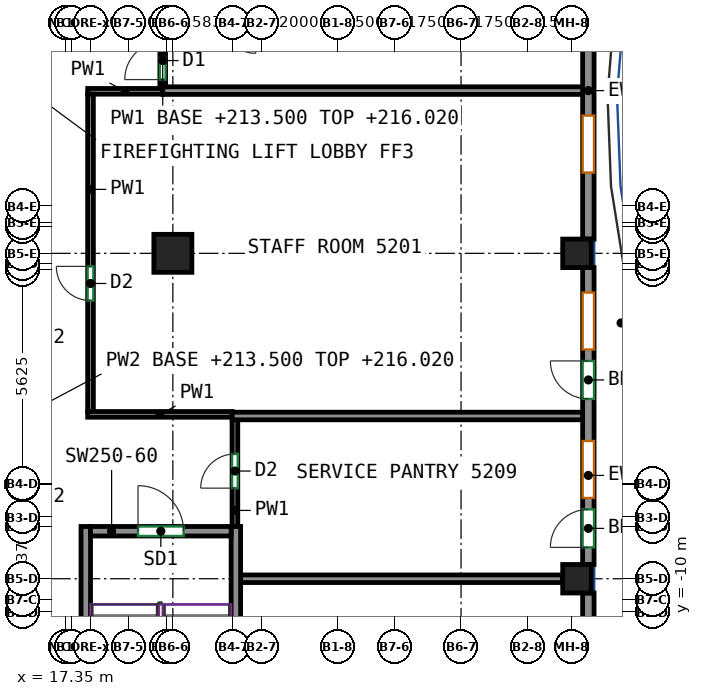
"""IFC4 building model, lengths in metres.
Left out: names, types, materials, properties, quantities, classifications, styles, units other than length and angle.
Written with IfcOpenShell. Run it as: python <this file> out.ifc"""

import sys

from ifc_helpers import new_model, si_unit, direction, frame, frame_2d, origin, origin_2d, place, context, subcontext, project, spatial, rectangle, extrude, source, transform, mapped, element, fill, save


model = new_model("IFC4")
c1 = context("Model", 3, precision=1e-05, world=origin(), true_north=direction((0.0, 1.0)))
c2 = subcontext(c1, "Body", "Model", "MODEL_VIEW")
j1 = project(units=[si_unit("LENGTHUNIT", "METRE"), si_unit("PLANEANGLEUNIT", "RADIAN")], contexts=[c1])
p1 = place(None, origin())
s1 = spatial("IfcSite", under=j1, at=p1, CompositionType="ELEMENT")
p2 = place(p1, origin())
s2 = spatial("IfcBuilding", under=s1, at=p2, CompositionType="ELEMENT")
p3 = place(p2, frame((0.0, 0.0, 213.5)))
s3 = spatial("IfcBuildingStorey", under=s2, at=p3, CompositionType="ELEMENT", Elevation=213.5)
m1 = source(origin(), c2, "Body", "SweptSolid", [
    extrude(rectangle(XDim=1.0, YDim=1.0, at=origin_2d()), origin(), (0.0, 0.0, 1.0), 3.12),
])
p4 = place(p3, frame((20.167, -0.562, 0.0), z_axis=(0.0, 0.0, 1.0), x_axis=(1.0, 0.0, 0.0)))
e1 = element("IfcColumn", 1, at=p4, inside=s3, PredefinedType="COLUMN", context=c2, shape_type="MappedRepresentation", body=[
    mapped(m1, transform((0.0, 0.0, 0.0))),
])
m2 = source(origin(), c2, "Body", "SweptSolid", [
    extrude(rectangle(XDim=0.75, YDim=0.75, at=origin_2d()), origin(), (0.0, 0.0, 1.0), 3.12),
])
for number, where, z_axis, x_axis in (
    (2, (30.8, -9.125, 0.0), (0.0, 0.0, 1.0), (1.0, 0.0, 0.0)),
    (3, (30.8, -0.562, 0.0), (0.0, 0.0, 1.0), (1.0, 0.0, 0.0)),
):
    element("IfcColumn", number, at=place(p3, frame(where, z_axis=z_axis, x_axis=x_axis)), inside=s3, PredefinedType="COLUMN", context=c2, shape_type="MappedRepresentation", body=[
        mapped(m2, transform((0.0, 0.0, 0.0))),
    ])
m3 = source(origin(), c2, "Body", "SweptSolid", [
    extrude(rectangle(XDim=8.0, YDim=0.25, at=frame_2d((4.0, 0.0))), origin(), (0.0, 0.0, 1.0), 3.12),
])
for number, where, z_axis, x_axis in (
    (4, (17.875, -15.75, 0.0), (0.0, 0.0, 1.0), (0.0, 1.0, 0.0)),
    (5, (21.825, -15.75, 0.0), (0.0, 0.0, 1.0), (0.0, 1.0, 0.0)),
):
    element("IfcWall", number, at=place(p3, frame(where, z_axis=z_axis, x_axis=x_axis)), inside=s3, PredefinedType="SHEAR", context=c2, shape_type="MappedRepresentation", body=[
        mapped(m3, transform((0.0, 0.0, 0.0))),
    ])
m4 = source(origin(), c2, "Body", "SweptSolid", [
    extrude(rectangle(XDim=3.7, YDim=0.25, at=frame_2d((1.85, 0.0))), origin(), (0.0, 0.0, 1.0), 3.12),
])
p5 = place(p3, frame((18.0, -7.875, 0.0), z_axis=(0.0, 0.0, 1.0), x_axis=(1.0, 0.0, 0.0)))
e6 = element("IfcWall", 6, at=p5, inside=s3, PredefinedType="SHEAR", context=c2, shape_type="MappedRepresentation", body=[
    mapped(m4, transform((0.0, 0.0, 0.0))),
])
p6 = place(p5, frame((1.25, 0.0, 0.0)))
e7 = element("IfcOpeningElement", 7, at=p6, cuts=e6, PredefinedType="OPENING", context=c2, shape_type="SweptSolid", body=[
    extrude(rectangle(XDim=1.2, YDim=2.1, at=frame_2d((0.6, 1.05))), frame((0.0, 0.135, 0.0), z_axis=(0.0, -1.0, 0.0), x_axis=(1.0, 0.0, 0.0)), (0.0, 0.0, 1.0), 0.27),
])
m5 = source(origin(), c2, "Body", "SweptSolid", [
    extrude(rectangle(XDim=7.812, YDim=0.3, at=frame_2d((3.906, 0.0))), origin(), (0.0, 0.0, 1.0), 3.12),
])
p7 = place(p3, frame((31.1, -17.312, 0.0), z_axis=(0.0, 0.0, 1.0), x_axis=(0.0, 1.0, 0.0)))
e8 = element("IfcWall", 8, at=p7, inside=s3, PredefinedType="SOLIDWALL", context=c2, shape_type="MappedRepresentation", body=[
    mapped(m5, transform((0.0, 0.0, 0.0))),
])
p8 = place(p7, frame((1.75, 0.0, 0.85)))
e9 = element("IfcOpeningElement", 9, at=p8, cuts=e8, PredefinedType="OPENING", context=c2, shape_type="SweptSolid", body=[
    extrude(rectangle(XDim=1.5, YDim=1.95, at=frame_2d((0.75, 0.975))), frame((0.0, 0.16, 0.0), z_axis=(0.0, -1.0, 0.0), x_axis=(1.0, 0.0, 0.0)), (0.0, 0.0, 1.0), 0.32),
])
p9 = place(p7, frame((0.45, 0.0, 0.0)))
e10 = element("IfcOpeningElement", 10, at=p9, cuts=e8, PredefinedType="OPENING", context=c2, shape_type="SweptSolid", body=[
    extrude(rectangle(XDim=1.0, YDim=2.1, at=frame_2d((0.5, 1.05))), frame((0.0, 0.16, 0.0), z_axis=(0.0, -1.0, 0.0), x_axis=(1.0, 0.0, 0.0)), (0.0, 0.0, 1.0), 0.32),
])
p10 = place(p7, frame((5.656, 0.0, 0.85)))
e11 = element("IfcOpeningElement", 11, at=p10, cuts=e8, PredefinedType="OPENING", context=c2, shape_type="SweptSolid", body=[
    extrude(rectangle(XDim=1.5, YDim=1.95, at=frame_2d((0.75, 0.975))), frame((0.0, 0.16, 0.0), z_axis=(0.0, -1.0, 0.0), x_axis=(1.0, 0.0, 0.0)), (0.0, 0.0, 1.0), 0.32),
])
p11 = place(p7, frame((4.356, 0.0, 0.0)))
e12 = element("IfcOpeningElement", 12, at=p11, cuts=e8, PredefinedType="OPENING", context=c2, shape_type="SweptSolid", body=[
    extrude(rectangle(XDim=1.0, YDim=2.1, at=frame_2d((0.5, 1.05))), frame((0.0, 0.16, 0.0), z_axis=(0.0, -1.0, 0.0), x_axis=(1.0, 0.0, 0.0)), (0.0, 0.0, 1.0), 0.32),
])
p12 = place(p3, frame((31.1, -8.75, 0.0), z_axis=(0.0, 0.0, 1.0), x_axis=(0.0, 1.0, 0.0)))
e13 = element("IfcWall", 13, at=p12, inside=s3, PredefinedType="SOLIDWALL", context=c2, shape_type="MappedRepresentation", body=[
    mapped(m5, transform((0.0, 0.0, 0.0))),
])
p13 = place(p12, frame((1.75, 0.0, 0.85)))
e14 = element("IfcOpeningElement", 14, at=p13, cuts=e13, PredefinedType="OPENING", context=c2, shape_type="SweptSolid", body=[
    extrude(rectangle(XDim=1.5, YDim=1.95, at=frame_2d((0.75, 0.975))), frame((0.0, 0.16, 0.0), z_axis=(0.0, -1.0, 0.0), x_axis=(1.0, 0.0, 0.0)), (0.0, 0.0, 1.0), 0.32),
])
p14 = place(p12, frame((0.45, 0.0, 0.0)))
e15 = element("IfcOpeningElement", 15, at=p14, cuts=e13, PredefinedType="OPENING", context=c2, shape_type="SweptSolid", body=[
    extrude(rectangle(XDim=1.0, YDim=2.1, at=frame_2d((0.5, 1.05))), frame((0.0, 0.16, 0.0), z_axis=(0.0, -1.0, 0.0), x_axis=(1.0, 0.0, 0.0)), (0.0, 0.0, 1.0), 0.32),
])
p15 = place(p12, frame((5.656, 0.0, 0.85)))
e16 = element("IfcOpeningElement", 16, at=p15, cuts=e13, PredefinedType="OPENING", context=c2, shape_type="SweptSolid", body=[
    extrude(rectangle(XDim=1.5, YDim=1.95, at=frame_2d((0.75, 0.975))), frame((0.0, 0.16, 0.0), z_axis=(0.0, -1.0, 0.0), x_axis=(1.0, 0.0, 0.0)), (0.0, 0.0, 1.0), 0.32),
])
p16 = place(p12, frame((4.356, 0.0, 0.0)))
e17 = element("IfcOpeningElement", 17, at=p16, cuts=e13, PredefinedType="OPENING", context=c2, shape_type="SweptSolid", body=[
    extrude(rectangle(XDim=1.0, YDim=2.1, at=frame_2d((0.5, 1.05))), frame((0.0, 0.16, 0.0), z_axis=(0.0, -1.0, 0.0), x_axis=(1.0, 0.0, 0.0)), (0.0, 0.0, 1.0), 0.32),
])
p17 = place(p3, frame((31.1, -0.188, 0.0), z_axis=(0.0, 0.0, 1.0), x_axis=(0.0, 1.0, 0.0)))
e18 = element("IfcWall", 18, at=p17, inside=s3, PredefinedType="SOLIDWALL", context=c2, shape_type="MappedRepresentation", body=[
    mapped(m5, transform((0.0, 0.0, 0.0))),
])
p18 = place(p17, frame((1.75, 0.0, 0.85)))
e19 = element("IfcOpeningElement", 19, at=p18, cuts=e18, PredefinedType="OPENING", context=c2, shape_type="SweptSolid", body=[
    extrude(rectangle(XDim=1.5, YDim=1.95, at=frame_2d((0.75, 0.975))), frame((0.0, 0.16, 0.0), z_axis=(0.0, -1.0, 0.0), x_axis=(1.0, 0.0, 0.0)), (0.0, 0.0, 1.0), 0.32),
])
p19 = place(p17, frame((5.656, 0.0, 0.85)))
e20 = element("IfcOpeningElement", 20, at=p19, cuts=e18, PredefinedType="OPENING", context=c2, shape_type="SweptSolid", body=[
    extrude(rectangle(XDim=1.5, YDim=1.95, at=frame_2d((0.75, 0.975))), frame((0.0, 0.16, 0.0), z_axis=(0.0, -1.0, 0.0), x_axis=(1.0, 0.0, 0.0)), (0.0, 0.0, 1.0), 0.32),
])
p20 = place(p3, frame((19.9, 3.809, 0.0), z_axis=(0.0, 0.0, 1.0), x_axis=(0.0, 1.0, 0.0)))
e21 = element("IfcWall", 21, at=p20, inside=s3, PredefinedType="PARTITIONING", context=c2, shape_type="SweptSolid", body=[
    extrude(rectangle(XDim=1.751, YDim=0.15, at=frame_2d((0.875, 0.0))), origin(), (0.0, 0.0, 1.0), 2.52),
])
p21 = place(p20, frame((0.2, 0.0, 0.0)))
e22 = element("IfcOpeningElement", 22, at=p21, cuts=e21, PredefinedType="OPENING", context=c2, shape_type="SweptSolid", body=[
    extrude(rectangle(XDim=1.0, YDim=2.1, at=frame_2d((0.5, 1.05))), frame((0.0, 0.085, 0.0), z_axis=(0.0, -1.0, 0.0), x_axis=(1.0, 0.0, 0.0)), (0.0, 0.0, 1.0), 0.17),
])
p22 = place(p3, frame((17.925, 3.7, 0.0), z_axis=(0.0, 0.0, 1.0), x_axis=(1.0, 0.0, 0.0)))
e23 = element("IfcWall", 23, at=p22, inside=s3, PredefinedType="PARTITIONING", context=c2, shape_type="SweptSolid", body=[
    extrude(rectangle(XDim=1.975, YDim=0.15, at=frame_2d((0.987, 0.0))), origin(), (0.0, 0.0, 1.0), 3.12),
])
p23 = place(p3, frame((18.0, -4.725, 0.0), z_axis=(0.0, 0.0, 1.0), x_axis=(0.0, 1.0, 0.0)))
e24 = element("IfcWall", 24, at=p23, inside=s3, PredefinedType="PARTITIONING", context=c2, shape_type="SweptSolid", body=[
    extrude(rectangle(XDim=8.35, YDim=0.15, at=frame_2d((4.175, 0.0))), origin(), (0.0, 0.0, 1.0), 3.12),
])
p24 = place(p23, frame((2.919, 0.0, 0.0)))
e25 = element("IfcOpeningElement", 25, at=p24, cuts=e24, PredefinedType="OPENING", context=c2, shape_type="SweptSolid", body=[
    extrude(rectangle(XDim=0.9, YDim=2.1, at=frame_2d((0.45, 1.05))), frame((0.0, 0.085, 0.0), z_axis=(0.0, -1.0, 0.0), x_axis=(1.0, 0.0, 0.0)), (0.0, 0.0, 1.0), 0.17),
])
p25 = place(p3, frame((17.925, -4.8, 0.0), z_axis=(0.0, 0.0, 1.0), x_axis=(1.0, 0.0, 0.0)))
e26 = element("IfcWall", 26, at=p25, inside=s3, PredefinedType="PARTITIONING", context=c2, shape_type="SweptSolid", body=[
    extrude(rectangle(XDim=3.802, YDim=0.15, at=frame_2d((1.901, 0.0))), origin(), (0.0, 0.0, 1.0), 3.12),
])
p26 = place(p3, frame((21.8, -7.75, 0.0), z_axis=(0.0, 0.0, 1.0), x_axis=(0.0, 1.0, 0.0)))
e27 = element("IfcWall", 27, at=p26, inside=s3, PredefinedType="PARTITIONING", context=c2, shape_type="SweptSolid", body=[
    extrude(rectangle(XDim=2.817, YDim=0.15, at=frame_2d((1.408, 0.0))), origin(), (0.0, 0.0, 1.0), 3.12),
])
p27 = place(p26, frame((1.009, 0.0, 0.0)))
e28 = element("IfcOpeningElement", 28, at=p27, cuts=e27, PredefinedType="OPENING", context=c2, shape_type="SweptSolid", body=[
    extrude(rectangle(XDim=0.9, YDim=2.1, at=frame_2d((0.45, 1.05))), frame((0.0, 0.085, 0.0), z_axis=(0.0, -1.0, 0.0), x_axis=(1.0, 0.0, 0.0)), (0.0, 0.0, 1.0), 0.17),
])
p28 = place(p3, frame((19.902, 3.719, 0.0), z_axis=(0.0, 0.0, 1.0), x_axis=(1.0, 0.0, 0.0)))
e29 = element("IfcWall", 29, at=p28, inside=s3, PredefinedType="PARTITIONING", context=c2, shape_type="SweptSolid", body=[
    extrude(rectangle(XDim=11.098, YDim=0.2, at=frame_2d((5.549, 0.0))), origin(), (0.0, 0.0, 1.0), 3.12),
])
p29 = place(p3, frame((21.727, -4.843, 0.0), z_axis=(0.0, 0.0, 1.0), x_axis=(1.0, 0.0, 0.0)))
e30 = element("IfcWall", 30, at=p29, inside=s3, PredefinedType="PARTITIONING", context=c2, shape_type="SweptSolid", body=[
    extrude(rectangle(XDim=9.273, YDim=0.2, at=frame_2d((4.636, 0.0))), origin(), (0.0, 0.0, 1.0), 3.12),
])
p30 = place(p3, frame((21.95, -9.125, 0.0), z_axis=(0.0, 0.0, 1.0), x_axis=(1.0, 0.0, 0.0)))
e31 = element("IfcWall", 31, at=p30, inside=s3, PredefinedType="PARTITIONING", context=c2, shape_type="SweptSolid", body=[
    extrude(rectangle(XDim=8.475, YDim=0.2, at=frame_2d((4.238, 0.0))), origin(), (0.0, 0.0, 1.0), 3.12),
])
p31 = place(p13, origin())
e32 = element("IfcWindow", 32, at=p31, inside=s3, PartitioningType="SINGLE_PANEL", PredefinedType="WINDOW", context=c2, shape_type="SweptSolid", body=[
    extrude(rectangle(XDim=1.5, YDim=1.95, at=frame_2d((0.75, 0.975))), frame((0.0, 0.03, 0.0), z_axis=(0.0, -1.0, 0.0), x_axis=(1.0, 0.0, 0.0)), (0.0, 0.0, 1.0), 0.06),
])
fill(e14, e32)
p32 = place(p14, origin())
e33 = element("IfcDoor", 33, at=p32, inside=s3, OperationType="SINGLE_SWING_LEFT", PredefinedType="DOOR", context=c2, shape_type="SweptSolid", body=[
    extrude(rectangle(XDim=1.0, YDim=2.1, at=frame_2d((0.5, 1.05))), frame((0.0, 0.025, 0.0), z_axis=(0.0, -1.0, 0.0), x_axis=(1.0, 0.0, 0.0)), (0.0, 0.0, 1.0), 0.05),
])
fill(e15, e33)
p33 = place(p15, origin())
e34 = element("IfcWindow", 34, at=p33, inside=s3, PartitioningType="SINGLE_PANEL", PredefinedType="WINDOW", context=c2, shape_type="SweptSolid", body=[
    extrude(rectangle(XDim=1.5, YDim=1.95, at=frame_2d((0.75, 0.975))), frame((0.0, 0.03, 0.0), z_axis=(0.0, -1.0, 0.0), x_axis=(1.0, 0.0, 0.0)), (0.0, 0.0, 1.0), 0.06),
])
fill(e16, e34)
p34 = place(p16, origin())
e35 = element("IfcDoor", 35, at=p34, inside=s3, OperationType="SINGLE_SWING_RIGHT", PredefinedType="DOOR", context=c2, shape_type="SweptSolid", body=[
    extrude(rectangle(XDim=1.0, YDim=2.1, at=frame_2d((0.5, 1.05))), frame((0.0, 0.025, 0.0), z_axis=(0.0, -1.0, 0.0), x_axis=(1.0, 0.0, 0.0)), (0.0, 0.0, 1.0), 0.05),
])
fill(e17, e35)
p35 = place(p18, origin())
e36 = element("IfcWindow", 36, at=p35, inside=s3, PartitioningType="SINGLE_PANEL", PredefinedType="WINDOW", context=c2, shape_type="SweptSolid", body=[
    extrude(rectangle(XDim=1.5, YDim=1.95, at=frame_2d((0.75, 0.975))), frame((0.0, 0.03, 0.0), z_axis=(0.0, -1.0, 0.0), x_axis=(1.0, 0.0, 0.0)), (0.0, 0.0, 1.0), 0.06),
])
fill(e19, e36)
p36 = place(p6, origin())
e37 = element("IfcDoor", 37, at=p36, inside=s3, OperationType="DOUBLE_DOOR_SINGLE_SWING", PredefinedType="DOOR", context=c2, shape_type="SweptSolid", body=[
    extrude(rectangle(XDim=1.2, YDim=2.1, at=frame_2d((0.6, 1.05))), frame((0.0, 0.025, 0.0), z_axis=(0.0, -1.0, 0.0), x_axis=(1.0, 0.0, 0.0)), (0.0, 0.0, 1.0), 0.05),
])
fill(e7, e37)
p37 = place(p27, origin())
e38 = element("IfcDoor", 38, at=p37, inside=s3, OperationType="SINGLE_SWING_LEFT", PredefinedType="DOOR", context=c2, shape_type="SweptSolid", body=[
    extrude(rectangle(XDim=0.9, YDim=2.1, at=frame_2d((0.45, 1.05))), frame((0.0, 0.025, 0.0), z_axis=(0.0, -1.0, 0.0), x_axis=(1.0, 0.0, 0.0)), (0.0, 0.0, 1.0), 0.05),
])
fill(e28, e38)
p38 = place(p24, origin())
e39 = element("IfcDoor", 39, at=p38, inside=s3, OperationType="SINGLE_SWING_RIGHT", PredefinedType="DOOR", context=c2, shape_type="SweptSolid", body=[
    extrude(rectangle(XDim=0.9, YDim=2.1, at=frame_2d((0.45, 1.05))), frame((0.0, 0.025, 0.0), z_axis=(0.0, -1.0, 0.0), x_axis=(1.0, 0.0, 0.0)), (0.0, 0.0, 1.0), 0.05),
])
fill(e25, e39)
p39 = place(p21, origin())
e40 = element("IfcDoor", 40, at=p39, inside=s3, OperationType="SINGLE_SWING_LEFT", PredefinedType="DOOR", context=c2, shape_type="SweptSolid", body=[
    extrude(rectangle(XDim=1.0, YDim=2.1, at=frame_2d((0.5, 1.05))), frame((0.0, 0.025, 0.0), z_axis=(0.0, -1.0, 0.0), x_axis=(1.0, 0.0, 0.0)), (0.0, 0.0, 1.0), 0.05),
])
fill(e22, e40)
save(model, sys.argv[1])
